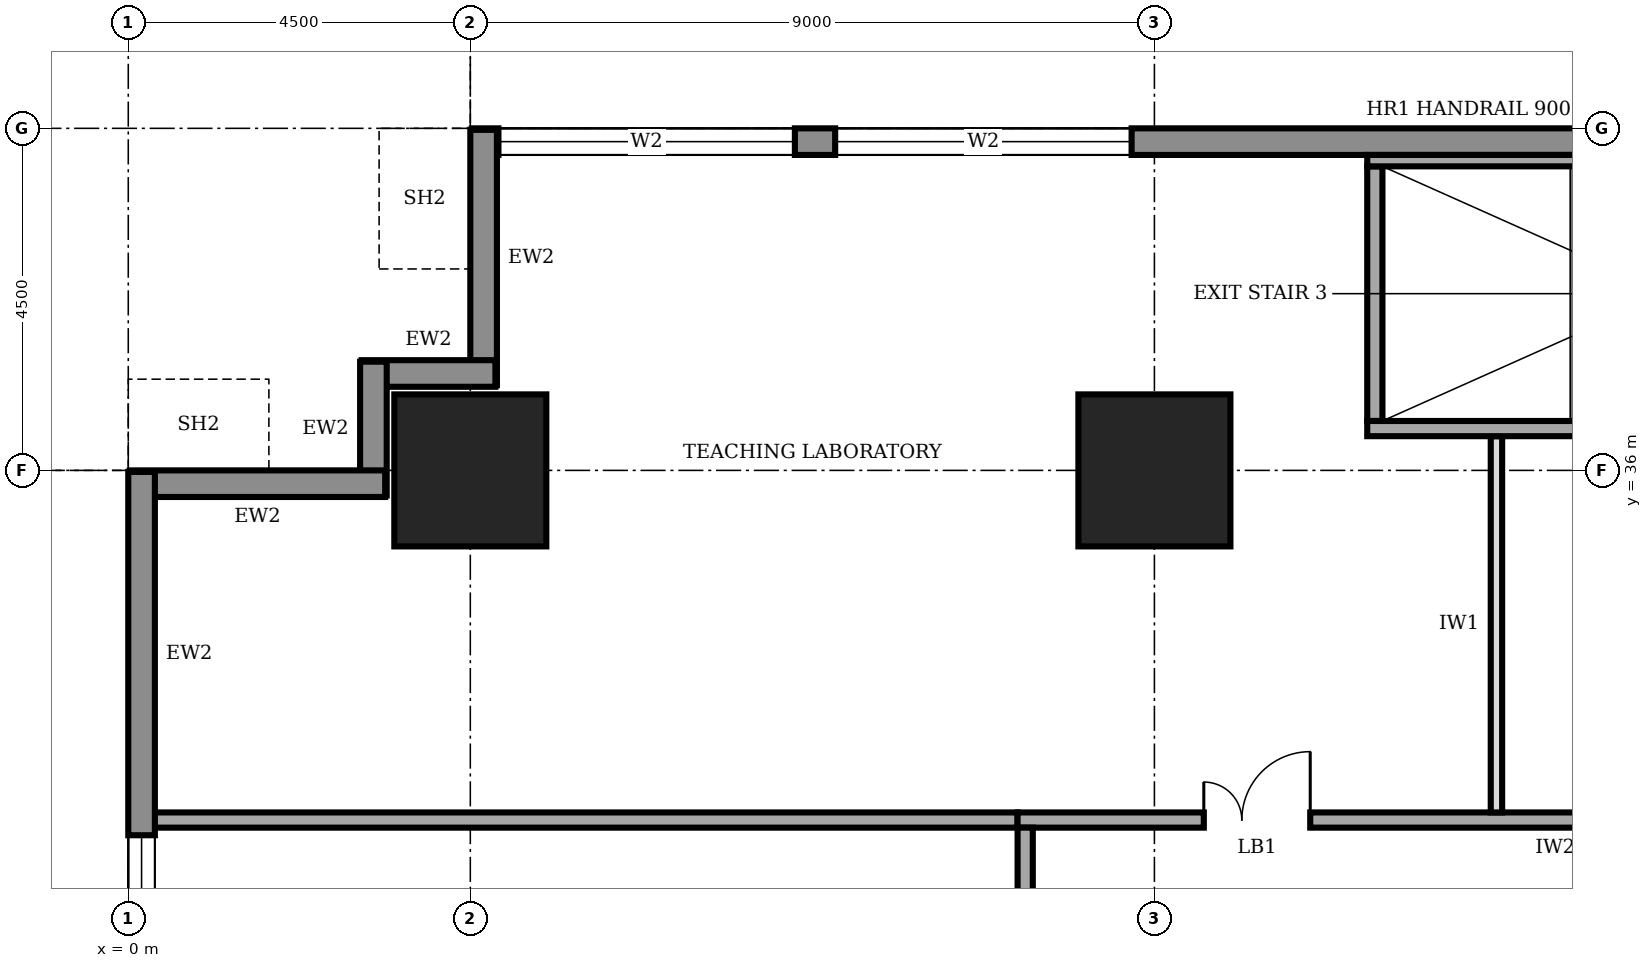
"""IFC4 building model, lengths in metres.
Left out: names, types, materials, properties, quantities, classifications, styles, units other than length and angle.
Written with IfcOpenShell. Run it as: python <this file> out.ifc"""

import sys

from ifc_helpers import new_model, si_unit, direction, frame, frame_2d, origin, origin_2d, place, context, subcontext, project, spatial, rectangle, extrude, element, fill, save


model = new_model("IFC4")
c1 = context("Model", 3, precision=1e-05, world=origin(), true_north=direction((0.0, 1.0)))
c2 = subcontext(c1, "Body", "Model", "MODEL_VIEW")
j1 = project(units=[si_unit("LENGTHUNIT", "METRE"), si_unit("PLANEANGLEUNIT", "RADIAN")], contexts=[c1])
p1 = place(None, origin())
s1 = spatial("IfcSite", under=j1, at=p1, CompositionType="ELEMENT")
p2 = place(p1, origin())
s2 = spatial("IfcBuilding", under=s1, at=p2, CompositionType="ELEMENT")
p3 = place(p2, frame((0.0, 0.0, 69.0)))
s3 = spatial("IfcBuildingStorey", under=s2, at=p3, CompositionType="ELEMENT", Elevation=69.0)
for number, where, z_axis, x_axis in (
    (1, (4.5, 36.0, 0.0), (0.0, 0.0, 1.0), (1.0, 0.0, 0.0)),
    (2, (13.5, 36.0, 0.0), (0.0, 0.0, 1.0), (1.0, 0.0, 0.0)),
):
    element("IfcColumn", number, at=place(p3, frame(where, z_axis=z_axis, x_axis=x_axis)), inside=s3, PredefinedType="COLUMN", context=c2, shape_type="SweptSolid", body=[
        extrude(rectangle(XDim=2.0, YDim=2.0, at=origin_2d()), origin(), (0.0, 0.0, 1.0), 4.0),
    ])
p4 = place(p3, frame((35.98, 40.325, 0.0), z_axis=(0.0, 0.0, 1.0), x_axis=(-1.0, 0.0, 0.0)))
e3 = element("IfcWall", 3, at=p4, inside=s3, PredefinedType="STANDARD", context=c2, shape_type="SweptSolid", body=[
    extrude(rectangle(XDim=31.46, YDim=0.35, at=frame_2d((15.73, 0.0))), origin(), (0.0, 0.0, 1.0), 3.75),
])
p5 = place(p4, frame((27.21, 0.0, 0.6)))
e4 = element("IfcOpeningElement", 4, at=p5, cuts=e3, PredefinedType="OPENING", context=c2, shape_type="SweptSolid", body=[
    extrude(rectangle(XDim=3.9, YDim=2.6, at=frame_2d((1.95, 1.3))), frame((0.0, 0.185, 0.0), z_axis=(0.0, -1.0, 0.0), x_axis=(1.0, 0.0, 0.0)), (0.0, 0.0, 1.0), 0.37),
])
p6 = place(p4, frame((22.78, 0.0, 0.6)))
e5 = element("IfcOpeningElement", 5, at=p6, cuts=e3, PredefinedType="OPENING", context=c2, shape_type="SweptSolid", body=[
    extrude(rectangle(XDim=3.9, YDim=2.6, at=frame_2d((1.95, 1.3))), frame((0.0, 0.185, 0.0), z_axis=(0.0, -1.0, 0.0), x_axis=(1.0, 0.0, 0.0)), (0.0, 0.0, 1.0), 0.37),
])
p7 = place(p4, frame((4.78, 0.0, 0.6)))
e6 = element("IfcOpeningElement", 6, at=p7, cuts=e3, PredefinedType="OPENING", context=c2, shape_type="SweptSolid", body=[
    extrude(rectangle(XDim=3.9, YDim=2.6, at=frame_2d((1.95, 1.3))), frame((0.0, 0.185, 0.0), z_axis=(0.0, -1.0, 0.0), x_axis=(1.0, 0.0, 0.0)), (0.0, 0.0, 1.0), 0.37),
])
p8 = place(p3, frame((4.675, 40.48, 0.0), z_axis=(0.0, 0.0, 1.0), x_axis=(0.0, -1.0, 0.0)))
e7 = element("IfcWall", 7, at=p8, inside=s3, PredefinedType="STANDARD", context=c2, shape_type="SweptSolid", body=[
    extrude(rectangle(XDim=3.36, YDim=0.35, at=frame_2d((1.68, 0.0))), origin(), (0.0, 0.0, 1.0), 2.85),
])
for number, where, z_axis, x_axis in (
    (8, (4.83, 37.275, 0.0), (0.0, 0.0, 1.0), (-1.0, 0.0, 0.0)),
    (9, (3.225, 37.43, 0.0), (0.0, 0.0, 1.0), (0.0, -1.0, 0.0)),
):
    element("IfcWall", number, at=place(p3, frame(where, z_axis=z_axis, x_axis=x_axis)), inside=s3, PredefinedType="STANDARD", context=c2, shape_type="SweptSolid", body=[
        extrude(rectangle(XDim=1.76, YDim=0.35, at=frame_2d((0.88, 0.0))), origin(), (0.0, 0.0, 1.0), 3.75),
    ])
p9 = place(p3, frame((3.38, 35.825, 0.0), z_axis=(0.0, 0.0, 1.0), x_axis=(-1.0, 0.0, 0.0)))
e10 = element("IfcWall", 10, at=p9, inside=s3, PredefinedType="STANDARD", context=c2, shape_type="SweptSolid", body=[
    extrude(rectangle(XDim=3.36, YDim=0.35, at=frame_2d((1.68, 0.0))), origin(), (0.0, 0.0, 1.0), 2.85),
])
p10 = place(p3, frame((0.175, 35.98, 0.0), z_axis=(0.0, 0.0, 1.0), x_axis=(0.0, -1.0, 0.0)))
e11 = element("IfcWall", 11, at=p10, inside=s3, PredefinedType="STANDARD", context=c2, shape_type="SweptSolid", body=[
    extrude(rectangle(XDim=31.46, YDim=0.35, at=frame_2d((15.73, 0.0))), origin(), (0.0, 0.0, 1.0), 3.75),
])
p11 = place(p10, frame((27.21, 0.0, 0.6)))
e12 = element("IfcOpeningElement", 12, at=p11, cuts=e11, PredefinedType="OPENING", context=c2, shape_type="SweptSolid", body=[
    extrude(rectangle(XDim=3.9, YDim=2.6, at=frame_2d((1.95, 1.3))), frame((0.0, 0.185, 0.0), z_axis=(0.0, -1.0, 0.0), x_axis=(1.0, 0.0, 0.0)), (0.0, 0.0, 1.0), 0.37),
])
p12 = place(p10, frame((22.78, 0.0, 0.6)))
e13 = element("IfcOpeningElement", 13, at=p12, cuts=e11, PredefinedType="OPENING", context=c2, shape_type="SweptSolid", body=[
    extrude(rectangle(XDim=3.9, YDim=2.6, at=frame_2d((1.95, 1.3))), frame((0.0, 0.185, 0.0), z_axis=(0.0, -1.0, 0.0), x_axis=(1.0, 0.0, 0.0)), (0.0, 0.0, 1.0), 0.37),
])
p13 = place(p10, frame((18.28, 0.0, 0.6)))
e14 = element("IfcOpeningElement", 14, at=p13, cuts=e11, PredefinedType="OPENING", context=c2, shape_type="SweptSolid", body=[
    extrude(rectangle(XDim=3.9, YDim=2.6, at=frame_2d((1.95, 1.3))), frame((0.0, 0.185, 0.0), z_axis=(0.0, -1.0, 0.0), x_axis=(1.0, 0.0, 0.0)), (0.0, 0.0, 1.0), 0.37),
])
p14 = place(p10, frame((13.78, 0.0, 0.6)))
e15 = element("IfcOpeningElement", 15, at=p14, cuts=e11, PredefinedType="OPENING", context=c2, shape_type="SweptSolid", body=[
    extrude(rectangle(XDim=3.9, YDim=2.6, at=frame_2d((1.95, 1.3))), frame((0.0, 0.185, 0.0), z_axis=(0.0, -1.0, 0.0), x_axis=(1.0, 0.0, 0.0)), (0.0, 0.0, 1.0), 0.37),
])
p15 = place(p10, frame((9.28, 0.0, 0.6)))
e16 = element("IfcOpeningElement", 16, at=p15, cuts=e11, PredefinedType="OPENING", context=c2, shape_type="SweptSolid", body=[
    extrude(rectangle(XDim=3.9, YDim=2.6, at=frame_2d((1.95, 1.3))), frame((0.0, 0.185, 0.0), z_axis=(0.0, -1.0, 0.0), x_axis=(1.0, 0.0, 0.0)), (0.0, 0.0, 1.0), 0.37),
])
p16 = place(p10, frame((4.78, 0.0, 0.6)))
e17 = element("IfcOpeningElement", 17, at=p16, cuts=e11, PredefinedType="OPENING", context=c2, shape_type="SweptSolid", body=[
    extrude(rectangle(XDim=3.9, YDim=2.6, at=frame_2d((1.95, 1.3))), frame((0.0, 0.185, 0.0), z_axis=(0.0, -1.0, 0.0), x_axis=(1.0, 0.0, 0.0)), (0.0, 0.0, 1.0), 0.37),
])
p17 = place(p3, frame((30.1, 31.4, 0.0), z_axis=(0.0, 0.0, 1.0), x_axis=(-1.0, 0.0, 0.0)))
e18 = element("IfcWall", 18, at=p17, inside=s3, PredefinedType="SOLIDWALL", context=c2, shape_type="SweptSolid", body=[
    extrude(rectangle(XDim=18.4, YDim=0.2, at=frame_2d((9.2, 0.0))), origin(), (0.0, 0.0, 1.0), 3.75),
])
p18 = place(p17, frame((14.55, 0.0, 0.0)))
e19 = element("IfcOpeningElement", 19, at=p18, cuts=e18, PredefinedType="OPENING", context=c2, shape_type="SweptSolid", body=[
    extrude(rectangle(XDim=1.4, YDim=2.1, at=frame_2d((0.7, 1.05))), frame((0.0, 0.11, 0.0), z_axis=(0.0, -1.0, 0.0), x_axis=(1.0, 0.0, 0.0)), (0.0, 0.0, 1.0), 0.22),
])
p19 = place(p17, frame((7.1, 0.0, 0.0)))
e20 = element("IfcOpeningElement", 20, at=p19, cuts=e18, PredefinedType="OPENING", context=c2, shape_type="SweptSolid", body=[
    extrude(rectangle(XDim=1.0, YDim=2.1, at=frame_2d((0.5, 1.05))), frame((0.0, 0.11, 0.0), z_axis=(0.0, -1.0, 0.0), x_axis=(1.0, 0.0, 0.0)), (0.0, 0.0, 1.0), 0.22),
])
p20 = place(p17, frame((0.55, 0.0, 0.0)))
e21 = element("IfcOpeningElement", 21, at=p20, cuts=e18, PredefinedType="OPENING", context=c2, shape_type="SweptSolid", body=[
    extrude(rectangle(XDim=1.8, YDim=2.1, at=frame_2d((0.9, 1.05))), frame((0.0, 0.11, 0.0), z_axis=(0.0, -1.0, 0.0), x_axis=(1.0, 0.0, 0.0)), (0.0, 0.0, 1.0), 0.22),
])
p21 = place(p3, frame((11.8, 31.3, 0.0), z_axis=(0.0, 0.0, 1.0), x_axis=(0.0, -1.0, 0.0)))
e22 = element("IfcWall", 22, at=p21, inside=s3, PredefinedType="SOLIDWALL", context=c2, shape_type="SweptSolid", body=[
    extrude(rectangle(XDim=22.3, YDim=0.2, at=frame_2d((11.15, 0.0))), origin(), (0.0, 0.0, 1.0), 3.75),
])
p22 = place(p21, frame((19.55, 0.0, 0.0)))
e23 = element("IfcOpeningElement", 23, at=p22, cuts=e22, PredefinedType="OPENING", context=c2, shape_type="SweptSolid", body=[
    extrude(rectangle(XDim=1.0, YDim=2.1, at=frame_2d((0.5, 1.05))), frame((0.0, 0.11, 0.0), z_axis=(0.0, -1.0, 0.0), x_axis=(1.0, 0.0, 0.0)), (0.0, 0.0, 1.0), 0.22),
])
p23 = place(p21, frame((15.45, 0.0, 0.0)))
e24 = element("IfcOpeningElement", 24, at=p23, cuts=e22, PredefinedType="OPENING", context=c2, shape_type="SweptSolid", body=[
    extrude(rectangle(XDim=0.9, YDim=2.1, at=frame_2d((0.45, 1.05))), frame((0.0, 0.11, 0.0), z_axis=(0.0, -1.0, 0.0), x_axis=(1.0, 0.0, 0.0)), (0.0, 0.0, 1.0), 0.22),
])
p24 = place(p21, frame((12.45, 0.0, 0.0)))
e25 = element("IfcOpeningElement", 25, at=p24, cuts=e22, PredefinedType="OPENING", context=c2, shape_type="SweptSolid", body=[
    extrude(rectangle(XDim=0.9, YDim=2.1, at=frame_2d((0.45, 1.05))), frame((0.0, 0.11, 0.0), z_axis=(0.0, -1.0, 0.0), x_axis=(1.0, 0.0, 0.0)), (0.0, 0.0, 1.0), 0.22),
])
p25 = place(p21, frame((7.6, 0.0, 0.0)))
e26 = element("IfcOpeningElement", 26, at=p25, cuts=e22, PredefinedType="OPENING", context=c2, shape_type="SweptSolid", body=[
    extrude(rectangle(XDim=0.9, YDim=2.1, at=frame_2d((0.45, 1.05))), frame((0.0, 0.11, 0.0), z_axis=(0.0, -1.0, 0.0), x_axis=(1.0, 0.0, 0.0)), (0.0, 0.0, 1.0), 0.22),
])
p26 = place(p21, frame((4.8, 0.0, 0.0)))
e27 = element("IfcOpeningElement", 27, at=p26, cuts=e22, PredefinedType="OPENING", context=c2, shape_type="SweptSolid", body=[
    extrude(rectangle(XDim=1.0, YDim=2.1, at=frame_2d((0.5, 1.05))), frame((0.0, 0.11, 0.0), z_axis=(0.0, -1.0, 0.0), x_axis=(1.0, 0.0, 0.0)), (0.0, 0.0, 1.0), 0.22),
])
p27 = place(p21, frame((10.3, 0.0, 0.0)))
e28 = element("IfcOpeningElement", 28, at=p27, cuts=e22, PredefinedType="OPENING", context=c2, shape_type="SweptSolid", body=[
    extrude(rectangle(XDim=1.0, YDim=2.1, at=frame_2d((0.5, 1.05))), frame((0.0, 0.11, 0.0), z_axis=(0.0, -1.0, 0.0), x_axis=(1.0, 0.0, 0.0)), (0.0, 0.0, 1.0), 0.22),
])
p28 = place(p21, frame((1.55, 0.0, 0.0)))
e29 = element("IfcOpeningElement", 29, at=p28, cuts=e22, PredefinedType="OPENING", context=c2, shape_type="SweptSolid", body=[
    extrude(rectangle(XDim=1.0, YDim=2.1, at=frame_2d((0.5, 1.05))), frame((0.0, 0.11, 0.0), z_axis=(0.0, -1.0, 0.0), x_axis=(1.0, 0.0, 0.0)), (0.0, 0.0, 1.0), 0.22),
])
p29 = place(p3, frame((0.3, 31.4, 0.0), z_axis=(0.0, 0.0, 1.0), x_axis=(1.0, 0.0, 0.0)))
e30 = element("IfcWall", 30, at=p29, inside=s3, PredefinedType="SOLIDWALL", context=c2, shape_type="SweptSolid", body=[
    extrude(rectangle(XDim=11.4, YDim=0.2, at=frame_2d((5.7, 0.0))), origin(), (0.0, 0.0, 1.0), 3.75),
])
p30 = place(p3, frame((18.0, 31.5, 0.0), z_axis=(0.0, 0.0, 1.0), x_axis=(0.0, 1.0, 0.0)))
e31 = element("IfcWall", 31, at=p30, inside=s3, PredefinedType="PARTITIONING", context=c2, shape_type="SweptSolid", body=[
    extrude(rectangle(XDim=4.95, YDim=0.15, at=frame_2d((2.475, 0.0))), origin(), (0.0, 0.0, 1.0), 3.75),
])
p31 = place(p3, frame((16.3, 36.55, 0.0), z_axis=(0.0, 0.0, 1.0), x_axis=(1.0, 0.0, 0.0)))
e32 = element("IfcWall", 32, at=p31, inside=s3, PredefinedType="SOLIDWALL", context=c2, shape_type="SweptSolid", body=[
    extrude(rectangle(XDim=7.9, YDim=0.2, at=frame_2d((3.95, 0.0))), origin(), (0.0, 0.0, 1.0), 3.75),
])
p32 = place(p31, frame((6.3, 0.0, 0.0)))
e33 = element("IfcOpeningElement", 33, at=p32, cuts=e32, PredefinedType="OPENING", context=c2, shape_type="SweptSolid", body=[
    extrude(rectangle(XDim=1.0, YDim=2.1, at=frame_2d((0.5, 1.05))), frame((0.0, 0.11, 0.0), z_axis=(0.0, -1.0, 0.0), x_axis=(1.0, 0.0, 0.0)), (0.0, 0.0, 1.0), 0.22),
])
p33 = place(p3, frame((16.3, 40.075, 0.0), z_axis=(0.0, 0.0, 1.0), x_axis=(1.0, 0.0, 0.0)))
e34 = element("IfcWall", 34, at=p33, inside=s3, PredefinedType="SOLIDWALL", context=c2, shape_type="SweptSolid", body=[
    extrude(rectangle(XDim=7.9, YDim=0.15, at=frame_2d((3.95, 0.0))), origin(), (0.0, 0.0, 1.0), 3.75),
])
p34 = place(p3, frame((16.4, 36.65, 0.0), z_axis=(0.0, 0.0, 1.0), x_axis=(0.0, 1.0, 0.0)))
e35 = element("IfcWall", 35, at=p34, inside=s3, PredefinedType="SOLIDWALL", context=c2, shape_type="SweptSolid", body=[
    extrude(rectangle(XDim=3.35, YDim=0.2, at=frame_2d((1.675, 0.0))), origin(), (0.0, 0.0, 1.0), 3.75),
])
p35 = place(p5, origin())
e36 = element("IfcWindow", 36, at=p35, inside=s3, PartitioningType="SINGLE_PANEL", PredefinedType="WINDOW", context=c2, shape_type="SweptSolid", body=[
    extrude(rectangle(XDim=3.9, YDim=2.6, at=frame_2d((1.95, 1.3))), frame((0.0, 0.03, 0.0), z_axis=(0.0, -1.0, 0.0), x_axis=(1.0, 0.0, 0.0)), (0.0, 0.0, 1.0), 0.06),
])
fill(e4, e36)
p36 = place(p6, origin())
e37 = element("IfcWindow", 37, at=p36, inside=s3, PartitioningType="SINGLE_PANEL", PredefinedType="WINDOW", context=c2, shape_type="SweptSolid", body=[
    extrude(rectangle(XDim=3.9, YDim=2.6, at=frame_2d((1.95, 1.3))), frame((0.0, 0.03, 0.0), z_axis=(0.0, -1.0, 0.0), x_axis=(1.0, 0.0, 0.0)), (0.0, 0.0, 1.0), 0.06),
])
fill(e5, e37)
p37 = place(p16, origin())
e38 = element("IfcWindow", 38, at=p37, inside=s3, PartitioningType="SINGLE_PANEL", PredefinedType="WINDOW", context=c2, shape_type="SweptSolid", body=[
    extrude(rectangle(XDim=3.9, YDim=2.6, at=frame_2d((1.95, 1.3))), frame((0.0, 0.03, 0.0), z_axis=(0.0, -1.0, 0.0), x_axis=(1.0, 0.0, 0.0)), (0.0, 0.0, 1.0), 0.06),
])
fill(e17, e38)
p38 = place(p18, frame((1.4, 0.0, 0.0), z_axis=(0.0, 0.0, 1.0), x_axis=(-1.0, 0.0, 0.0)))
e39 = element("IfcDoor", 39, at=p38, inside=s3, OperationType="DOUBLE_DOOR_SINGLE_SWING", PredefinedType="DOOR", context=c2, shape_type="SweptSolid", body=[
    extrude(rectangle(XDim=1.4, YDim=2.1, at=frame_2d((0.7, 1.05))), frame((0.0, 0.025, 0.0), z_axis=(0.0, -1.0, 0.0), x_axis=(1.0, 0.0, 0.0)), (0.0, 0.0, 1.0), 0.05),
])
fill(e19, e39)
save(model, sys.argv[1])
